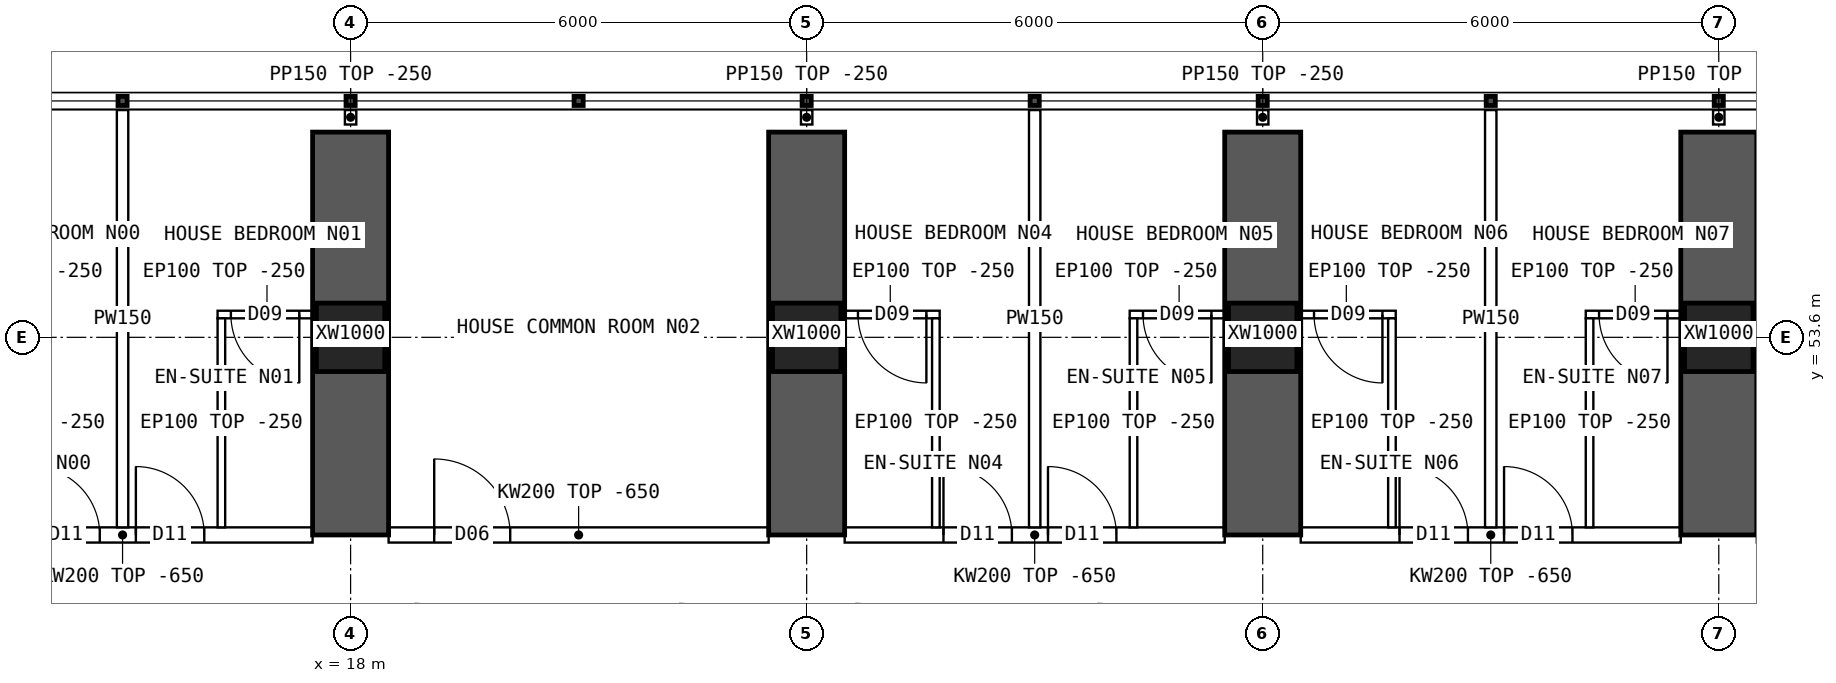
"""IFC4 building model, lengths in metres.
Left out: names, types, materials, properties, quantities, classifications, styles, units other than length and angle.
Written with IfcOpenShell. Run it as: python <this file> out.ifc"""

import sys

from ifc_helpers import new_model, si_unit, direction, frame, frame_2d, origin, origin_2d, place, context, subcontext, project, spatial, polyline, rectangle, hollow_rectangle, outline, extrude, element, fill, save


model = new_model("IFC4")
c1 = context("Model", 3, precision=1e-05, world=origin(), true_north=direction((0.0, 1.0)))
c2 = subcontext(c1, "Body", "Model", "MODEL_VIEW")
j1 = project(units=[si_unit("LENGTHUNIT", "METRE"), si_unit("PLANEANGLEUNIT", "RADIAN")], contexts=[c1])
p1 = place(None, origin())
s1 = spatial("IfcSite", under=j1, at=p1, CompositionType="ELEMENT")
p2 = place(p1, origin())
s2 = spatial("IfcBuilding", under=s1, at=p2, CompositionType="ELEMENT")
p3 = place(p2, frame((0.0, 0.0, 42.7)))
s3 = spatial("IfcBuildingStorey", under=s2, at=p3, CompositionType="ELEMENT", Elevation=42.7)
for number, where, z_axis, x_axis in (
    (1, (18.0, 53.6, 0.0), (0.0, 0.0, 1.0), (1.0, 0.0, 0.0)),
    (2, (24.0, 53.6, 0.0), (0.0, 0.0, 1.0), (1.0, 0.0, 0.0)),
    (3, (30.0, 53.6, 0.0), (0.0, 0.0, 1.0), (1.0, 0.0, 0.0)),
    (4, (36.0, 53.6, 0.0), (0.0, 0.0, 1.0), (1.0, 0.0, 0.0)),
):
    element("IfcColumn", number, at=place(p3, frame(where, z_axis=z_axis, x_axis=x_axis)), inside=s3, PredefinedType="COLUMN", context=c2, shape_type="SweptSolid", body=[
        extrude(hollow_rectangle(XDim=0.9, YDim=0.9, WallThickness=0.09, at=origin_2d()), origin(), (0.0, 0.0, 1.0), 3.75),
    ])
for number, where, z_axis, x_axis in (
    (5, (18.0, 51.0, 0.0), (0.0, 0.0, 1.0), (0.0, 1.0, 0.0)),
    (6, (24.0, 51.0, 0.0), (0.0, 0.0, 1.0), (0.0, 1.0, 0.0)),
    (7, (30.0, 51.0, 0.0), (0.0, 0.0, 1.0), (0.0, 1.0, 0.0)),
    (8, (36.0, 51.0, 0.0), (0.0, 0.0, 1.0), (0.0, 1.0, 0.0)),
):
    element("IfcWall", number, at=place(p3, frame(where, z_axis=z_axis, x_axis=x_axis)), inside=s3, PredefinedType="SHEAR", context=c2, shape_type="SweptSolid", body=[
        extrude(rectangle(XDim=5.3, YDim=1.0, at=frame_2d((2.65, 0.0))), origin(), (0.0, 0.0, 1.0), 3.75),
    ])
p4 = place(p3, frame((12.5, 51.0, 0.0), z_axis=(0.0, 0.0, 1.0), x_axis=(1.0, 0.0, 0.0)))
e9 = element("IfcWall", 9, at=p4, inside=s3, PredefinedType="SOLIDWALL", context=c2, shape_type="SweptSolid", body=[
    extrude(outline(polyline([(0.0, 0.0), (5.0, 0.0), (5.0, 3.1), (0.0, 3.1), (0.0, 0.0)])), frame((0.0, 0.1, 0.0), z_axis=(0.0, -1.0, 0.0), x_axis=(1.0, 0.0, 0.0)), (0.0, 0.0, 1.0), 0.2),
])
p5 = place(p4, frame((1.3, 0.0, 0.0)))
e10 = element("IfcOpeningElement", 10, at=p5, cuts=e9, PredefinedType="OPENING", context=c2, shape_type="SweptSolid", body=[
    extrude(rectangle(XDim=0.9, YDim=2.1, at=frame_2d((0.45, 1.05))), frame((0.0, 0.11, 0.0), z_axis=(0.0, -1.0, 0.0), x_axis=(1.0, 0.0, 0.0)), (0.0, 0.0, 1.0), 0.22),
])
p6 = place(p4, frame((2.675, 0.0, 0.0)))
e11 = element("IfcOpeningElement", 11, at=p6, cuts=e9, PredefinedType="OPENING", context=c2, shape_type="SweptSolid", body=[
    extrude(rectangle(XDim=0.9, YDim=2.1, at=frame_2d((0.45, 1.05))), frame((0.0, 0.11, 0.0), z_axis=(0.0, -1.0, 0.0), x_axis=(1.0, 0.0, 0.0)), (0.0, 0.0, 1.0), 0.22),
])
p7 = place(p3, frame((18.5, 51.0, 0.0), z_axis=(0.0, 0.0, 1.0), x_axis=(1.0, 0.0, 0.0)))
e12 = element("IfcWall", 12, at=p7, inside=s3, PredefinedType="SOLIDWALL", context=c2, shape_type="SweptSolid", body=[
    extrude(outline(polyline([(0.0, 0.0), (5.0, 0.0), (5.0, 3.1), (0.0, 3.1), (0.0, 0.0)])), frame((0.0, 0.1, 0.0), z_axis=(0.0, -1.0, 0.0), x_axis=(1.0, 0.0, 0.0)), (0.0, 0.0, 1.0), 0.2),
])
p8 = place(p7, frame((0.6, 0.0, 0.0)))
e13 = element("IfcOpeningElement", 13, at=p8, cuts=e12, PredefinedType="OPENING", context=c2, shape_type="SweptSolid", body=[
    extrude(rectangle(XDim=1.0, YDim=2.1, at=frame_2d((0.5, 1.05))), frame((0.0, 0.11, 0.0), z_axis=(0.0, -1.0, 0.0), x_axis=(1.0, 0.0, 0.0)), (0.0, 0.0, 1.0), 0.22),
])
p9 = place(p3, frame((24.5, 51.0, 0.0), z_axis=(0.0, 0.0, 1.0), x_axis=(1.0, 0.0, 0.0)))
e14 = element("IfcWall", 14, at=p9, inside=s3, PredefinedType="SOLIDWALL", context=c2, shape_type="SweptSolid", body=[
    extrude(outline(polyline([(0.0, 0.0), (5.0, 0.0), (5.0, 3.1), (0.0, 3.1), (0.0, 0.0)])), frame((0.0, 0.1, 0.0), z_axis=(0.0, -1.0, 0.0), x_axis=(1.0, 0.0, 0.0)), (0.0, 0.0, 1.0), 0.2),
])
p10 = place(p9, frame((1.3, 0.0, 0.0)))
e15 = element("IfcOpeningElement", 15, at=p10, cuts=e14, PredefinedType="OPENING", context=c2, shape_type="SweptSolid", body=[
    extrude(rectangle(XDim=0.9, YDim=2.1, at=frame_2d((0.45, 1.05))), frame((0.0, 0.11, 0.0), z_axis=(0.0, -1.0, 0.0), x_axis=(1.0, 0.0, 0.0)), (0.0, 0.0, 1.0), 0.22),
])
p11 = place(p9, frame((2.675, 0.0, 0.0)))
e16 = element("IfcOpeningElement", 16, at=p11, cuts=e14, PredefinedType="OPENING", context=c2, shape_type="SweptSolid", body=[
    extrude(rectangle(XDim=0.9, YDim=2.1, at=frame_2d((0.45, 1.05))), frame((0.0, 0.11, 0.0), z_axis=(0.0, -1.0, 0.0), x_axis=(1.0, 0.0, 0.0)), (0.0, 0.0, 1.0), 0.22),
])
p12 = place(p3, frame((30.5, 51.0, 0.0), z_axis=(0.0, 0.0, 1.0), x_axis=(1.0, 0.0, 0.0)))
e17 = element("IfcWall", 17, at=p12, inside=s3, PredefinedType="SOLIDWALL", context=c2, shape_type="SweptSolid", body=[
    extrude(outline(polyline([(0.0, 0.0), (5.0, 0.0), (5.0, 3.1), (0.0, 3.1), (0.0, 0.0)])), frame((0.0, 0.1, 0.0), z_axis=(0.0, -1.0, 0.0), x_axis=(1.0, 0.0, 0.0)), (0.0, 0.0, 1.0), 0.2),
])
p13 = place(p12, frame((1.3, 0.0, 0.0)))
e18 = element("IfcOpeningElement", 18, at=p13, cuts=e17, PredefinedType="OPENING", context=c2, shape_type="SweptSolid", body=[
    extrude(rectangle(XDim=0.9, YDim=2.1, at=frame_2d((0.45, 1.05))), frame((0.0, 0.11, 0.0), z_axis=(0.0, -1.0, 0.0), x_axis=(1.0, 0.0, 0.0)), (0.0, 0.0, 1.0), 0.22),
])
p14 = place(p12, frame((2.675, 0.0, 0.0)))
e19 = element("IfcOpeningElement", 19, at=p14, cuts=e17, PredefinedType="OPENING", context=c2, shape_type="SweptSolid", body=[
    extrude(rectangle(XDim=0.9, YDim=2.1, at=frame_2d((0.45, 1.05))), frame((0.0, 0.11, 0.0), z_axis=(0.0, -1.0, 0.0), x_axis=(1.0, 0.0, 0.0)), (0.0, 0.0, 1.0), 0.22),
])
p15 = place(p3, frame((15.0, 56.59, 0.0), z_axis=(0.0, 0.0, 1.0), x_axis=(0.0, -1.0, 0.0)))
e20 = element("IfcWall", 20, at=p15, inside=s3, PredefinedType="PARTITIONING", context=c2, shape_type="SweptSolid", body=[
    extrude(outline(polyline([(0.0, 0.0), (5.49, 0.0), (5.49, 3.1), (5.442, 3.1), (5.44, 3.5), (3.192, 3.5), (3.19, 3.1), (2.792, 3.1), (2.79, 3.5), (0.0, 3.5), (0.0, 0.0)])), frame((0.0, 0.075, 0.0), z_axis=(0.0, -1.0, 0.0), x_axis=(1.0, 0.0, 0.0)), (0.0, 0.0, 1.0), 0.15),
])
p16 = place(p3, frame((16.25, 53.9, 0.0), z_axis=(0.0, 0.0, 1.0), x_axis=(1.0, 0.0, 0.0)))
e21 = element("IfcWall", 21, at=p16, inside=s3, PredefinedType="PARTITIONING", context=c2, shape_type="SweptSolid", body=[
    extrude(rectangle(XDim=1.3, YDim=0.1, at=frame_2d((0.65, 0.0))), origin(), (0.0, 0.0, 1.0), 3.5),
])
p17 = place(p16, frame((0.175, 0.0, 0.0)))
e22 = element("IfcOpeningElement", 22, at=p17, cuts=e21, PredefinedType="OPENING", context=c2, shape_type="SweptSolid", body=[
    extrude(rectangle(XDim=0.9, YDim=2.1, at=frame_2d((0.45, 1.05))), frame((0.0, 0.06, 0.0), z_axis=(0.0, -1.0, 0.0), x_axis=(1.0, 0.0, 0.0)), (0.0, 0.0, 1.0), 0.12),
])
p18 = place(p3, frame((16.3, 53.85, 0.0), z_axis=(0.0, 0.0, 1.0), x_axis=(0.0, -1.0, 0.0)))
e23 = element("IfcWall", 23, at=p18, inside=s3, PredefinedType="PARTITIONING", context=c2, shape_type="SweptSolid", body=[
    extrude(outline(polyline([(0.0, 0.0), (2.75, 0.0), (2.75, 3.1), (2.702, 3.1), (2.7, 3.5), (0.452, 3.5), (0.45, 3.1), (0.0, 3.1), (0.0, 0.0)])), frame((0.0, 0.05, 0.0), z_axis=(0.0, -1.0, 0.0), x_axis=(1.0, 0.0, 0.0)), (0.0, 0.0, 1.0), 0.1),
])
p19 = place(p3, frame((27.0, 56.59, 0.0), z_axis=(0.0, 0.0, 1.0), x_axis=(0.0, -1.0, 0.0)))
e24 = element("IfcWall", 24, at=p19, inside=s3, PredefinedType="PARTITIONING", context=c2, shape_type="SweptSolid", body=[
    extrude(outline(polyline([(0.0, 0.0), (5.49, 0.0), (5.49, 3.1), (5.442, 3.1), (5.44, 3.5), (3.192, 3.5), (3.19, 3.1), (2.792, 3.1), (2.79, 3.5), (0.0, 3.5), (0.0, 0.0)])), frame((0.0, 0.075, 0.0), z_axis=(0.0, -1.0, 0.0), x_axis=(1.0, 0.0, 0.0)), (0.0, 0.0, 1.0), 0.15),
])
p20 = place(p3, frame((24.45, 53.9, 0.0), z_axis=(0.0, 0.0, 1.0), x_axis=(1.0, 0.0, 0.0)))
e25 = element("IfcWall", 25, at=p20, inside=s3, PredefinedType="PARTITIONING", context=c2, shape_type="SweptSolid", body=[
    extrude(rectangle(XDim=1.3, YDim=0.1, at=frame_2d((0.65, 0.0))), origin(), (0.0, 0.0, 1.0), 3.5),
])
p21 = place(p20, frame((0.225, 0.0, 0.0)))
e26 = element("IfcOpeningElement", 26, at=p21, cuts=e25, PredefinedType="OPENING", context=c2, shape_type="SweptSolid", body=[
    extrude(rectangle(XDim=0.9, YDim=2.1, at=frame_2d((0.45, 1.05))), frame((0.0, 0.06, 0.0), z_axis=(0.0, -1.0, 0.0), x_axis=(1.0, 0.0, 0.0)), (0.0, 0.0, 1.0), 0.12),
])
p22 = place(p3, frame((25.7, 53.85, 0.0), z_axis=(0.0, 0.0, 1.0), x_axis=(0.0, -1.0, 0.0)))
e27 = element("IfcWall", 27, at=p22, inside=s3, PredefinedType="PARTITIONING", context=c2, shape_type="SweptSolid", body=[
    extrude(outline(polyline([(0.0, 0.0), (2.75, 0.0), (2.75, 3.1), (2.702, 3.1), (2.7, 3.5), (0.452, 3.5), (0.45, 3.1), (0.0, 3.1), (0.0, 0.0)])), frame((0.0, 0.05, 0.0), z_axis=(0.0, -1.0, 0.0), x_axis=(1.0, 0.0, 0.0)), (0.0, 0.0, 1.0), 0.1),
])
p23 = place(p3, frame((28.25, 53.9, 0.0), z_axis=(0.0, 0.0, 1.0), x_axis=(1.0, 0.0, 0.0)))
e28 = element("IfcWall", 28, at=p23, inside=s3, PredefinedType="PARTITIONING", context=c2, shape_type="SweptSolid", body=[
    extrude(rectangle(XDim=1.3, YDim=0.1, at=frame_2d((0.65, 0.0))), origin(), (0.0, 0.0, 1.0), 3.5),
])
p24 = place(p23, frame((0.175, 0.0, 0.0)))
e29 = element("IfcOpeningElement", 29, at=p24, cuts=e28, PredefinedType="OPENING", context=c2, shape_type="SweptSolid", body=[
    extrude(rectangle(XDim=0.9, YDim=2.1, at=frame_2d((0.45, 1.05))), frame((0.0, 0.06, 0.0), z_axis=(0.0, -1.0, 0.0), x_axis=(1.0, 0.0, 0.0)), (0.0, 0.0, 1.0), 0.12),
])
p25 = place(p3, frame((28.3, 53.85, 0.0), z_axis=(0.0, 0.0, 1.0), x_axis=(0.0, -1.0, 0.0)))
e30 = element("IfcWall", 30, at=p25, inside=s3, PredefinedType="PARTITIONING", context=c2, shape_type="SweptSolid", body=[
    extrude(outline(polyline([(0.0, 0.0), (2.75, 0.0), (2.75, 3.1), (2.702, 3.1), (2.7, 3.5), (0.452, 3.5), (0.45, 3.1), (0.0, 3.1), (0.0, 0.0)])), frame((0.0, 0.05, 0.0), z_axis=(0.0, -1.0, 0.0), x_axis=(1.0, 0.0, 0.0)), (0.0, 0.0, 1.0), 0.1),
])
p26 = place(p3, frame((33.0, 56.59, 0.0), z_axis=(0.0, 0.0, 1.0), x_axis=(0.0, -1.0, 0.0)))
e31 = element("IfcWall", 31, at=p26, inside=s3, PredefinedType="PARTITIONING", context=c2, shape_type="SweptSolid", body=[
    extrude(outline(polyline([(0.0, 0.0), (5.49, 0.0), (5.49, 3.1), (5.442, 3.1), (5.44, 3.5), (3.192, 3.5), (3.19, 3.1), (2.792, 3.1), (2.79, 3.5), (0.0, 3.5), (0.0, 0.0)])), frame((0.0, 0.075, 0.0), z_axis=(0.0, -1.0, 0.0), x_axis=(1.0, 0.0, 0.0)), (0.0, 0.0, 1.0), 0.15),
])
p27 = place(p3, frame((30.45, 53.9, 0.0), z_axis=(0.0, 0.0, 1.0), x_axis=(1.0, 0.0, 0.0)))
e32 = element("IfcWall", 32, at=p27, inside=s3, PredefinedType="PARTITIONING", context=c2, shape_type="SweptSolid", body=[
    extrude(rectangle(XDim=1.3, YDim=0.1, at=frame_2d((0.65, 0.0))), origin(), (0.0, 0.0, 1.0), 3.5),
])
p28 = place(p27, frame((0.225, 0.0, 0.0)))
e33 = element("IfcOpeningElement", 33, at=p28, cuts=e32, PredefinedType="OPENING", context=c2, shape_type="SweptSolid", body=[
    extrude(rectangle(XDim=0.9, YDim=2.1, at=frame_2d((0.45, 1.05))), frame((0.0, 0.06, 0.0), z_axis=(0.0, -1.0, 0.0), x_axis=(1.0, 0.0, 0.0)), (0.0, 0.0, 1.0), 0.12),
])
p29 = place(p3, frame((31.7, 53.85, 0.0), z_axis=(0.0, 0.0, 1.0), x_axis=(0.0, -1.0, 0.0)))
e34 = element("IfcWall", 34, at=p29, inside=s3, PredefinedType="PARTITIONING", context=c2, shape_type="SweptSolid", body=[
    extrude(outline(polyline([(0.0, 0.0), (2.75, 0.0), (2.75, 3.1), (2.702, 3.1), (2.7, 3.5), (0.452, 3.5), (0.45, 3.1), (0.0, 3.1), (0.0, 0.0)])), frame((0.0, 0.05, 0.0), z_axis=(0.0, -1.0, 0.0), x_axis=(1.0, 0.0, 0.0)), (0.0, 0.0, 1.0), 0.1),
])
p30 = place(p3, frame((34.25, 53.9, 0.0), z_axis=(0.0, 0.0, 1.0), x_axis=(1.0, 0.0, 0.0)))
e35 = element("IfcWall", 35, at=p30, inside=s3, PredefinedType="PARTITIONING", context=c2, shape_type="SweptSolid", body=[
    extrude(rectangle(XDim=1.3, YDim=0.1, at=frame_2d((0.65, 0.0))), origin(), (0.0, 0.0, 1.0), 3.5),
])
p31 = place(p30, frame((0.175, 0.0, 0.0)))
e36 = element("IfcOpeningElement", 36, at=p31, cuts=e35, PredefinedType="OPENING", context=c2, shape_type="SweptSolid", body=[
    extrude(rectangle(XDim=0.9, YDim=2.1, at=frame_2d((0.45, 1.05))), frame((0.0, 0.06, 0.0), z_axis=(0.0, -1.0, 0.0), x_axis=(1.0, 0.0, 0.0)), (0.0, 0.0, 1.0), 0.12),
])
p32 = place(p3, frame((34.3, 53.85, 0.0), z_axis=(0.0, 0.0, 1.0), x_axis=(0.0, -1.0, 0.0)))
e37 = element("IfcWall", 37, at=p32, inside=s3, PredefinedType="PARTITIONING", context=c2, shape_type="SweptSolid", body=[
    extrude(outline(polyline([(0.0, 0.0), (2.75, 0.0), (2.75, 3.1), (2.702, 3.1), (2.7, 3.5), (0.452, 3.5), (0.45, 3.1), (0.0, 3.1), (0.0, 0.0)])), frame((0.0, 0.05, 0.0), z_axis=(0.0, -1.0, 0.0), x_axis=(1.0, 0.0, 0.0)), (0.0, 0.0, 1.0), 0.1),
])
for number, where, z_axis, x_axis in (
    (38, (18.0, 56.4, 0.0), (0.0, 0.0, 1.0), (0.0, 1.0, 0.0)),
    (39, (24.0, 56.4, 0.0), (0.0, 0.0, 1.0), (0.0, 1.0, 0.0)),
    (40, (30.0, 56.4, 0.0), (0.0, 0.0, 1.0), (0.0, 1.0, 0.0)),
    (41, (36.0, 56.4, 0.0), (0.0, 0.0, 1.0), (0.0, 1.0, 0.0)),
):
    element("IfcWall", number, at=place(p3, frame(where, z_axis=z_axis, x_axis=x_axis)), inside=s3, PredefinedType="PARTITIONING", context=c2, shape_type="SweptSolid", body=[
        extrude(rectangle(XDim=0.19, YDim=0.15, at=frame_2d((0.095, 0.0))), origin(), (0.0, 0.0, 1.0), 3.5),
    ])
p33 = place(p5, origin())
e42 = element("IfcDoor", 42, at=p33, inside=s3, OperationType="SINGLE_SWING_LEFT", PredefinedType="DOOR", context=c2, shape_type="SweptSolid", body=[
    extrude(rectangle(XDim=0.9, YDim=2.1, at=frame_2d((0.45, 1.05))), frame((0.0, 0.025, 0.0), z_axis=(0.0, -1.0, 0.0), x_axis=(1.0, 0.0, 0.0)), (0.0, 0.0, 1.0), 0.05),
])
fill(e10, e42)
p34 = place(p17, origin())
e43 = element("IfcDoor", 43, at=p34, inside=s3, OperationType="SINGLE_SWING_RIGHT", PredefinedType="DOOR", context=c2, shape_type="SweptSolid", body=[
    extrude(rectangle(XDim=0.9, YDim=2.1, at=frame_2d((0.45, 1.05))), frame((0.0, 0.025, 0.0), z_axis=(0.0, -1.0, 0.0), x_axis=(1.0, 0.0, 0.0)), (0.0, 0.0, 1.0), 0.05),
])
fill(e22, e43)
p35 = place(p6, origin())
e44 = element("IfcDoor", 44, at=p35, inside=s3, OperationType="SINGLE_SWING_LEFT", PredefinedType="DOOR", context=c2, shape_type="SweptSolid", body=[
    extrude(rectangle(XDim=0.9, YDim=2.1, at=frame_2d((0.45, 1.05))), frame((0.0, 0.025, 0.0), z_axis=(0.0, -1.0, 0.0), x_axis=(1.0, 0.0, 0.0)), (0.0, 0.0, 1.0), 0.05),
])
fill(e11, e44)
p36 = place(p8, origin())
e45 = element("IfcDoor", 45, at=p36, inside=s3, OperationType="SINGLE_SWING_LEFT", PredefinedType="DOOR", context=c2, shape_type="SweptSolid", body=[
    extrude(rectangle(XDim=1.0, YDim=2.1, at=frame_2d((0.5, 1.05))), frame((0.0, 0.025, 0.0), z_axis=(0.0, -1.0, 0.0), x_axis=(1.0, 0.0, 0.0)), (0.0, 0.0, 1.0), 0.05),
])
fill(e13, e45)
p37 = place(p21, origin())
e46 = element("IfcDoor", 46, at=p37, inside=s3, OperationType="SINGLE_SWING_RIGHT", PredefinedType="DOOR", context=c2, shape_type="SweptSolid", body=[
    extrude(rectangle(XDim=0.9, YDim=2.1, at=frame_2d((0.45, 1.05))), frame((0.0, 0.025, 0.0), z_axis=(0.0, -1.0, 0.0), x_axis=(1.0, 0.0, 0.0)), (0.0, 0.0, 1.0), 0.05),
])
fill(e26, e46)
p38 = place(p10, origin())
e47 = element("IfcDoor", 47, at=p38, inside=s3, OperationType="SINGLE_SWING_LEFT", PredefinedType="DOOR", context=c2, shape_type="SweptSolid", body=[
    extrude(rectangle(XDim=0.9, YDim=2.1, at=frame_2d((0.45, 1.05))), frame((0.0, 0.025, 0.0), z_axis=(0.0, -1.0, 0.0), x_axis=(1.0, 0.0, 0.0)), (0.0, 0.0, 1.0), 0.05),
])
fill(e15, e47)
p39 = place(p24, origin())
e48 = element("IfcDoor", 48, at=p39, inside=s3, OperationType="SINGLE_SWING_RIGHT", PredefinedType="DOOR", context=c2, shape_type="SweptSolid", body=[
    extrude(rectangle(XDim=0.9, YDim=2.1, at=frame_2d((0.45, 1.05))), frame((0.0, 0.025, 0.0), z_axis=(0.0, -1.0, 0.0), x_axis=(1.0, 0.0, 0.0)), (0.0, 0.0, 1.0), 0.05),
])
fill(e29, e48)
p40 = place(p11, origin())
e49 = element("IfcDoor", 49, at=p40, inside=s3, OperationType="SINGLE_SWING_LEFT", PredefinedType="DOOR", context=c2, shape_type="SweptSolid", body=[
    extrude(rectangle(XDim=0.9, YDim=2.1, at=frame_2d((0.45, 1.05))), frame((0.0, 0.025, 0.0), z_axis=(0.0, -1.0, 0.0), x_axis=(1.0, 0.0, 0.0)), (0.0, 0.0, 1.0), 0.05),
])
fill(e16, e49)
p41 = place(p28, origin())
e50 = element("IfcDoor", 50, at=p41, inside=s3, OperationType="SINGLE_SWING_RIGHT", PredefinedType="DOOR", context=c2, shape_type="SweptSolid", body=[
    extrude(rectangle(XDim=0.9, YDim=2.1, at=frame_2d((0.45, 1.05))), frame((0.0, 0.025, 0.0), z_axis=(0.0, -1.0, 0.0), x_axis=(1.0, 0.0, 0.0)), (0.0, 0.0, 1.0), 0.05),
])
fill(e33, e50)
p42 = place(p13, origin())
e51 = element("IfcDoor", 51, at=p42, inside=s3, OperationType="SINGLE_SWING_LEFT", PredefinedType="DOOR", context=c2, shape_type="SweptSolid", body=[
    extrude(rectangle(XDim=0.9, YDim=2.1, at=frame_2d((0.45, 1.05))), frame((0.0, 0.025, 0.0), z_axis=(0.0, -1.0, 0.0), x_axis=(1.0, 0.0, 0.0)), (0.0, 0.0, 1.0), 0.05),
])
fill(e18, e51)
p43 = place(p31, origin())
e52 = element("IfcDoor", 52, at=p43, inside=s3, OperationType="SINGLE_SWING_RIGHT", PredefinedType="DOOR", context=c2, shape_type="SweptSolid", body=[
    extrude(rectangle(XDim=0.9, YDim=2.1, at=frame_2d((0.45, 1.05))), frame((0.0, 0.025, 0.0), z_axis=(0.0, -1.0, 0.0), x_axis=(1.0, 0.0, 0.0)), (0.0, 0.0, 1.0), 0.05),
])
fill(e36, e52)
p44 = place(p14, origin())
e53 = element("IfcDoor", 53, at=p44, inside=s3, OperationType="SINGLE_SWING_LEFT", PredefinedType="DOOR", context=c2, shape_type="SweptSolid", body=[
    extrude(rectangle(XDim=0.9, YDim=2.1, at=frame_2d((0.45, 1.05))), frame((0.0, 0.025, 0.0), z_axis=(0.0, -1.0, 0.0), x_axis=(1.0, 0.0, 0.0)), (0.0, 0.0, 1.0), 0.05),
])
fill(e19, e53)
save(model, sys.argv[1])
